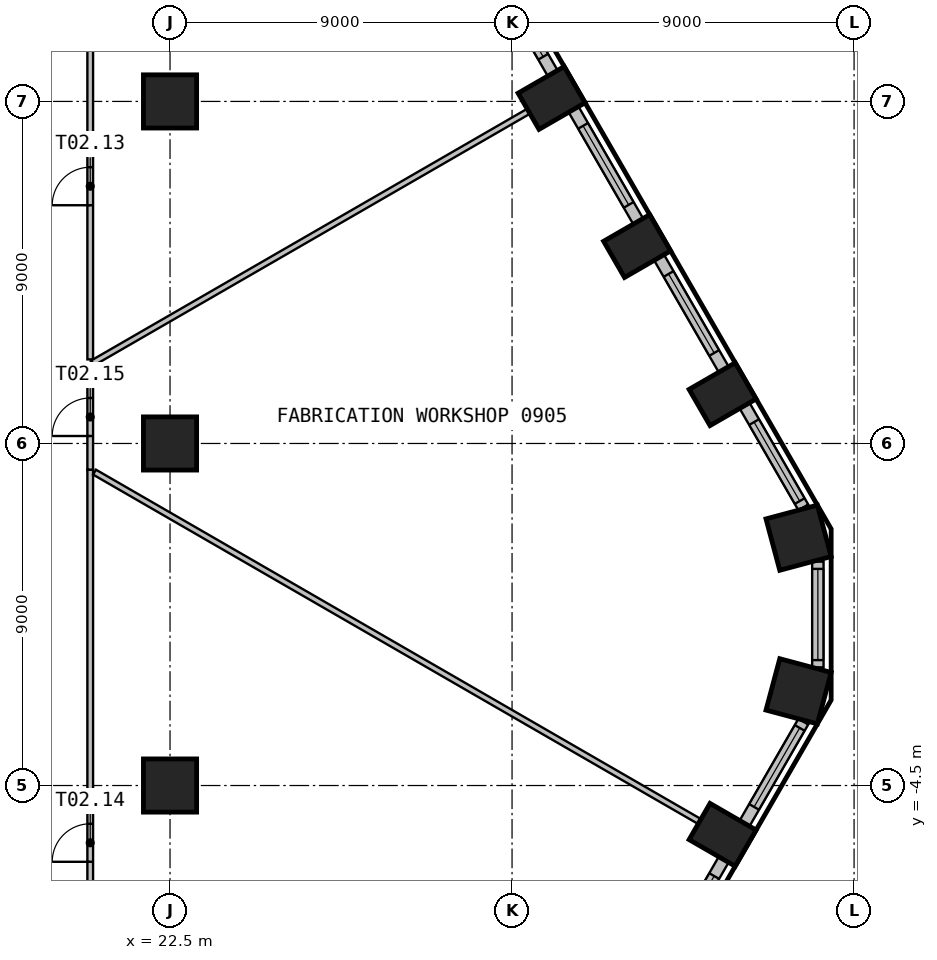
"""IFC4 building model, lengths in metres.
Left out: names, types, materials, properties, quantities, classifications, styles, units other than length and angle.
Written with IfcOpenShell. Run it as: python <this file> out.ifc"""

import sys

from ifc_helpers import new_model, si_unit, direction, frame, frame_2d, origin, origin_2d, place, context, subcontext, project, spatial, rectangle, circle, extrude, element, fill, save


model = new_model("IFC4")
c1 = context("Model", 3, precision=1e-05, world=origin(), true_north=direction((0.0, 1.0)))
c2 = subcontext(c1, "Body", "Model", "MODEL_VIEW")
j1 = project(units=[si_unit("LENGTHUNIT", "METRE"), si_unit("PLANEANGLEUNIT", "RADIAN")], contexts=[c1])
p1 = place(None, origin())
s1 = spatial("IfcSite", under=j1, at=p1, CompositionType="ELEMENT")
p2 = place(p1, origin())
s2 = spatial("IfcBuilding", under=s1, at=p2, CompositionType="ELEMENT")
p3 = place(p2, frame((0.0, 0.0, 41.7)))
s3 = spatial("IfcBuildingStorey", under=s2, at=p3, CompositionType="ELEMENT", Elevation=41.7)
p4 = place(p3, frame((37.041, -5.797, 0.0), z_axis=(0.0, 0.0, 1.0), x_axis=(0.5, 0.866025403784, 0.0)))
e1 = element("IfcColumn", 1, at=p4, inside=s3, PredefinedType="COLUMN", context=c2, shape_type="SweptSolid", body=[
    extrude(rectangle(XDim=1.1, YDim=1.4, at=origin_2d()), origin(), (0.0, 0.0, 1.0), 3.525),
])
for number, where, z_axis, x_axis in (
    (2, (39.04, -2.02, 0.0), (0.0, 0.0, 1.0), (0.259, 0.966, 0.0)),
    (3, (39.04, 2.02, 0.0), (0.0, 0.0, 1.0), (-0.259, 0.966, 0.0)),
):
    element("IfcColumn", number, at=place(p3, frame(where, z_axis=z_axis, x_axis=x_axis)), inside=s3, PredefinedType="COLUMN", context=c2, shape_type="SweptSolid", body=[
        extrude(rectangle(XDim=1.4, YDim=1.4, at=origin_2d()), origin(), (0.0, 0.0, 1.0), 3.525),
    ])
for number, where, z_axis, x_axis in (
    (4, (37.041, 5.797, 0.0), (0.0, 0.0, 1.0), (-0.5, 0.866, 0.0)),
    (5, (34.791, 9.694, 0.0), (0.0, 0.0, 1.0), (-0.5, 0.866, 0.0)),
    (6, (32.541, 13.591, 0.0), (0.0, 0.0, 1.0), (-0.5, 0.866, 0.0)),
):
    element("IfcColumn", number, at=place(p3, frame(where, z_axis=z_axis, x_axis=x_axis)), inside=s3, PredefinedType="COLUMN", context=c2, shape_type="SweptSolid", body=[
        extrude(rectangle(XDim=1.1, YDim=1.4, at=origin_2d()), origin(), (0.0, 0.0, 1.0), 3.525),
    ])
for number, where, z_axis, x_axis in (
    (7, (22.5, -4.5, 0.0), (0.0, 0.0, 1.0), (1.0, 0.0, 0.0)),
    (8, (22.5, 4.5, 0.0), (0.0, 0.0, 1.0), (1.0, 0.0, 0.0)),
    (9, (22.5, 13.5, 0.0), (0.0, 0.0, 1.0), (1.0, 0.0, 0.0)),
):
    element("IfcColumn", number, at=place(p3, frame(where, z_axis=z_axis, x_axis=x_axis)), inside=s3, PredefinedType="COLUMN", context=c2, shape_type="SweptSolid", body=[
        extrude(circle(Radius=0.7, at=origin_2d()), origin(), (0.0, 0.0, 1.0), 3.525),
    ])
p5 = place(p3, frame((35.369, -9.393, 0.0), z_axis=(0.0, 0.0, 1.0), x_axis=(0.499993955907, 0.866028893315, 0.0)))
e10 = element("IfcWall", 10, at=p5, inside=s3, PredefinedType="SOLIDWALL", context=c2, shape_type="SweptSolid", body=[
    extrude(rectangle(XDim=3.399, YDim=0.3, at=frame_2d((1.699, 0.0))), origin(), (0.0, 0.0, 1.0), 3.525),
])
p6 = place(p5, frame((0.5, 0.0, 0.9)))
e11 = element("IfcOpeningElement", 11, at=p6, cuts=e10, PredefinedType="OPENING", context=c2, shape_type="SweptSolid", body=[
    extrude(rectangle(XDim=2.4, YDim=2.1, at=frame_2d((1.2, 1.05))), frame((0.0, 0.16, 0.0), z_axis=(0.0, -1.0, 0.0), x_axis=(1.0, 0.0, 0.0)), (0.0, 0.0, 1.0), 0.32),
])
p7 = place(p3, frame((37.619, -5.495, 0.0), z_axis=(0.0, 0.0, 1.0), x_axis=(0.49997090907, 0.866042198789, 0.0)))
e12 = element("IfcWall", 12, at=p7, inside=s3, PredefinedType="SOLIDWALL", context=c2, shape_type="SweptSolid", body=[
    extrude(rectangle(XDim=3.091, YDim=0.3, at=frame_2d((1.545, 0.0))), origin(), (0.0, 0.0, 1.0), 3.525),
])
p8 = place(p7, frame((0.5, 0.0, 0.9)))
e13 = element("IfcOpeningElement", 13, at=p8, cuts=e12, PredefinedType="OPENING", context=c2, shape_type="SweptSolid", body=[
    extrude(rectangle(XDim=2.4, YDim=2.1, at=frame_2d((1.2, 1.05))), frame((0.0, 0.16, 0.0), z_axis=(0.0, -1.0, 0.0), x_axis=(1.0, 0.0, 0.0)), (0.0, 0.0, 1.0), 0.32),
])
p9 = place(p3, frame((39.547, -1.391, 0.0), z_axis=(0.0, 0.0, 1.0), x_axis=(0.0, 1.0, 0.0)))
e14 = element("IfcWall", 14, at=p9, inside=s3, PredefinedType="SOLIDWALL", context=c2, shape_type="SweptSolid", body=[
    extrude(rectangle(XDim=2.782, YDim=0.3, at=frame_2d((1.391, 0.0))), origin(), (0.0, 0.0, 1.0), 3.525),
])
p10 = place(p9, frame((0.191, 0.0, 0.9)))
e15 = element("IfcOpeningElement", 15, at=p10, cuts=e14, PredefinedType="OPENING", context=c2, shape_type="SweptSolid", body=[
    extrude(rectangle(XDim=2.4, YDim=2.1, at=frame_2d((1.2, 1.05))), frame((0.0, 0.16, 0.0), z_axis=(0.0, -1.0, 0.0), x_axis=(1.0, 0.0, 0.0)), (0.0, 0.0, 1.0), 0.32),
])
p11 = place(p3, frame((39.165, 2.819, 0.0), z_axis=(0.0, 0.0, 1.0), x_axis=(-0.49997090907, 0.866042198789, 0.0)))
e16 = element("IfcWall", 16, at=p11, inside=s3, PredefinedType="SOLIDWALL", context=c2, shape_type="SweptSolid", body=[
    extrude(rectangle(XDim=3.091, YDim=0.3, at=frame_2d((1.545, 0.0))), origin(), (0.0, 0.0, 1.0), 3.525),
])
p12 = place(p11, frame((0.191, 0.0, 0.9)))
e17 = element("IfcOpeningElement", 17, at=p12, cuts=e16, PredefinedType="OPENING", context=c2, shape_type="SweptSolid", body=[
    extrude(rectangle(XDim=2.4, YDim=2.1, at=frame_2d((1.2, 1.05))), frame((0.0, 0.16, 0.0), z_axis=(0.0, -1.0, 0.0), x_axis=(1.0, 0.0, 0.0)), (0.0, 0.0, 1.0), 0.32),
])
p13 = place(p3, frame((37.069, 6.449, 0.0), z_axis=(0.0, 0.0, 1.0), x_axis=(-0.499993955907, 0.866028893315, 0.0)))
e18 = element("IfcWall", 18, at=p13, inside=s3, PredefinedType="SOLIDWALL", context=c2, shape_type="SweptSolid", body=[
    extrude(rectangle(XDim=3.399, YDim=0.3, at=frame_2d((1.699, 0.0))), origin(), (0.0, 0.0, 1.0), 3.525),
])
p14 = place(p13, frame((0.5, 0.0, 0.9)))
e19 = element("IfcOpeningElement", 19, at=p14, cuts=e18, PredefinedType="OPENING", context=c2, shape_type="SweptSolid", body=[
    extrude(rectangle(XDim=2.4, YDim=2.1, at=frame_2d((1.2, 1.05))), frame((0.0, 0.16, 0.0), z_axis=(0.0, -1.0, 0.0), x_axis=(1.0, 0.0, 0.0)), (0.0, 0.0, 1.0), 0.32),
])
p15 = place(p3, frame((34.819, 10.346, 0.0), z_axis=(0.0, 0.0, 1.0), x_axis=(-0.499993955907, 0.866028893315, 0.0)))
e20 = element("IfcWall", 20, at=p15, inside=s3, PredefinedType="SOLIDWALL", context=c2, shape_type="SweptSolid", body=[
    extrude(rectangle(XDim=3.399, YDim=0.3, at=frame_2d((1.699, 0.0))), origin(), (0.0, 0.0, 1.0), 3.525),
])
p16 = place(p15, frame((0.5, 0.0, 0.9)))
e21 = element("IfcOpeningElement", 21, at=p16, cuts=e20, PredefinedType="OPENING", context=c2, shape_type="SweptSolid", body=[
    extrude(rectangle(XDim=2.4, YDim=2.1, at=frame_2d((1.2, 1.05))), frame((0.0, 0.16, 0.0), z_axis=(0.0, -1.0, 0.0), x_axis=(1.0, 0.0, 0.0)), (0.0, 0.0, 1.0), 0.32),
])
p17 = place(p3, frame((32.569, 14.243, 0.0), z_axis=(0.0, 0.0, 1.0), x_axis=(-0.499993955907, 0.866028893315, 0.0)))
e22 = element("IfcWall", 22, at=p17, inside=s3, PredefinedType="SOLIDWALL", context=c2, shape_type="SweptSolid", body=[
    extrude(rectangle(XDim=3.399, YDim=0.3, at=frame_2d((1.699, 0.0))), origin(), (0.0, 0.0, 1.0), 3.525),
])
p18 = place(p17, frame((0.5, 0.0, 0.9)))
e23 = element("IfcOpeningElement", 23, at=p18, cuts=e22, PredefinedType="OPENING", context=c2, shape_type="SweptSolid", body=[
    extrude(rectangle(XDim=2.4, YDim=2.1, at=frame_2d((1.2, 1.05))), frame((0.0, 0.16, 0.0), z_axis=(0.0, -1.0, 0.0), x_axis=(1.0, 0.0, 0.0)), (0.0, 0.0, 1.0), 0.32),
])
p19 = place(p3, frame((20.4, -15.825, 0.0), z_axis=(0.0, 0.0, 1.0), x_axis=(0.0, 1.0, 0.0)))
e24 = element("IfcWall", 24, at=p19, inside=s3, PredefinedType="PARTITIONING", context=c2, shape_type="SweptSolid", body=[
    extrude(rectangle(XDim=19.636, YDim=0.15, at=frame_2d((9.818, 0.0))), origin(), (0.0, 0.0, 1.0), 3.525),
])
p20 = place(p19, frame((9.318, 0.0, 0.0)))
e25 = element("IfcOpeningElement", 25, at=p20, cuts=e24, PredefinedType="OPENING", context=c2, shape_type="SweptSolid", body=[
    extrude(rectangle(XDim=1.0, YDim=2.1, at=frame_2d((0.5, 1.05))), frame((0.0, 0.085, 0.0), z_axis=(0.0, -1.0, 0.0), x_axis=(1.0, 0.0, 0.0)), (0.0, 0.0, 1.0), 0.17),
])
p21 = place(p3, frame((20.4, 3.811, 0.0), z_axis=(0.0, 0.0, 1.0), x_axis=(0.0, 1.0, 0.0)))
e26 = element("IfcWall", 26, at=p21, inside=s3, PredefinedType="PARTITIONING", context=c2, shape_type="SweptSolid", body=[
    extrude(rectangle(XDim=2.771, YDim=0.15, at=frame_2d((1.385, 0.0))), origin(), (0.0, 0.0, 1.0), 3.525),
])
p22 = place(p21, frame((0.885, 0.0, 0.0)))
e27 = element("IfcOpeningElement", 27, at=p22, cuts=e26, PredefinedType="OPENING", context=c2, shape_type="SweptSolid", body=[
    extrude(rectangle(XDim=1.0, YDim=2.1, at=frame_2d((0.5, 1.05))), frame((0.0, 0.085, 0.0), z_axis=(0.0, -1.0, 0.0), x_axis=(1.0, 0.0, 0.0)), (0.0, 0.0, 1.0), 0.17),
])
p23 = place(p3, frame((20.513, 3.746, 0.0), z_axis=(0.0, 0.0, 1.0), x_axis=(0.866010916479, -0.500025091909, 0.0)))
e28 = element("IfcWall", 28, at=p23, inside=s3, PredefinedType="PARTITIONING", context=c2, shape_type="SweptSolid", body=[
    extrude(rectangle(XDim=18.365, YDim=0.15, at=frame_2d((9.183, 0.0))), origin(), (0.0, 0.0, 1.0), 3.525),
])
p24 = place(p3, frame((20.4, 6.712, 0.0), z_axis=(0.0, 0.0, 1.0), x_axis=(0.0, 1.0, 0.0)))
e29 = element("IfcWall", 29, at=p24, inside=s3, PredefinedType="PARTITIONING", context=c2, shape_type="SweptSolid", body=[
    extrude(rectangle(XDim=9.113, YDim=0.15, at=frame_2d((4.557, 0.0))), origin(), (0.0, 0.0, 1.0), 3.525),
])
p25 = place(p24, frame((4.056, 0.0, 0.0)))
e30 = element("IfcOpeningElement", 30, at=p25, cuts=e29, PredefinedType="OPENING", context=c2, shape_type="SweptSolid", body=[
    extrude(rectangle(XDim=1.0, YDim=2.1, at=frame_2d((0.5, 1.05))), frame((0.0, 0.085, 0.0), z_axis=(0.0, -1.0, 0.0), x_axis=(1.0, 0.0, 0.0)), (0.0, 0.0, 1.0), 0.17),
])
p26 = place(p3, frame((31.917, 13.231, 0.0), z_axis=(0.0, 0.0, 1.0), x_axis=(-0.866032788616, -0.499987208879, 0.0)))
e31 = element("IfcWall", 31, at=p26, inside=s3, PredefinedType="PARTITIONING", context=c2, shape_type="SweptSolid", body=[
    extrude(rectangle(XDim=13.224, YDim=0.15, at=frame_2d((6.612, 0.0))), origin(), (0.0, 0.0, 1.0), 3.525),
])
p27 = place(p6, origin())
e32 = element("IfcWindow", 32, at=p27, inside=s3, PartitioningType="SINGLE_PANEL", PredefinedType="WINDOW", context=c2, shape_type="SweptSolid", body=[
    extrude(rectangle(XDim=2.4, YDim=2.1, at=frame_2d((1.2, 1.05))), frame((0.0, 0.03, 0.0), z_axis=(0.0, -1.0, 0.0), x_axis=(1.0, 0.0, 0.0)), (0.0, 0.0, 1.0), 0.06),
])
fill(e11, e32)
p28 = place(p8, origin())
e33 = element("IfcWindow", 33, at=p28, inside=s3, PartitioningType="SINGLE_PANEL", PredefinedType="WINDOW", context=c2, shape_type="SweptSolid", body=[
    extrude(rectangle(XDim=2.4, YDim=2.1, at=frame_2d((1.2, 1.05))), frame((0.0, 0.03, 0.0), z_axis=(0.0, -1.0, 0.0), x_axis=(1.0, 0.0, 0.0)), (0.0, 0.0, 1.0), 0.06),
])
fill(e13, e33)
p29 = place(p10, origin())
e34 = element("IfcWindow", 34, at=p29, inside=s3, PartitioningType="SINGLE_PANEL", PredefinedType="WINDOW", context=c2, shape_type="SweptSolid", body=[
    extrude(rectangle(XDim=2.4, YDim=2.1, at=frame_2d((1.2, 1.05))), frame((0.0, 0.03, 0.0), z_axis=(0.0, -1.0, 0.0), x_axis=(1.0, 0.0, 0.0)), (0.0, 0.0, 1.0), 0.06),
])
fill(e15, e34)
p30 = place(p12, origin())
e35 = element("IfcWindow", 35, at=p30, inside=s3, PartitioningType="SINGLE_PANEL", PredefinedType="WINDOW", context=c2, shape_type="SweptSolid", body=[
    extrude(rectangle(XDim=2.4, YDim=2.1, at=frame_2d((1.2, 1.05))), frame((0.0, 0.03, 0.0), z_axis=(0.0, -1.0, 0.0), x_axis=(1.0, 0.0, 0.0)), (0.0, 0.0, 1.0), 0.06),
])
fill(e17, e35)
p31 = place(p14, origin())
e36 = element("IfcWindow", 36, at=p31, inside=s3, PartitioningType="SINGLE_PANEL", PredefinedType="WINDOW", context=c2, shape_type="SweptSolid", body=[
    extrude(rectangle(XDim=2.4, YDim=2.1, at=frame_2d((1.2, 1.05))), frame((0.0, 0.03, 0.0), z_axis=(0.0, -1.0, 0.0), x_axis=(1.0, 0.0, 0.0)), (0.0, 0.0, 1.0), 0.06),
])
fill(e19, e36)
p32 = place(p16, origin())
e37 = element("IfcWindow", 37, at=p32, inside=s3, PartitioningType="SINGLE_PANEL", PredefinedType="WINDOW", context=c2, shape_type="SweptSolid", body=[
    extrude(rectangle(XDim=2.4, YDim=2.1, at=frame_2d((1.2, 1.05))), frame((0.0, 0.03, 0.0), z_axis=(0.0, -1.0, 0.0), x_axis=(1.0, 0.0, 0.0)), (0.0, 0.0, 1.0), 0.06),
])
fill(e21, e37)
p33 = place(p18, origin())
e38 = element("IfcWindow", 38, at=p33, inside=s3, PartitioningType="SINGLE_PANEL", PredefinedType="WINDOW", context=c2, shape_type="SweptSolid", body=[
    extrude(rectangle(XDim=2.4, YDim=2.1, at=frame_2d((1.2, 1.05))), frame((0.0, 0.03, 0.0), z_axis=(0.0, -1.0, 0.0), x_axis=(1.0, 0.0, 0.0)), (0.0, 0.0, 1.0), 0.06),
])
fill(e23, e38)
p34 = place(p25, origin())
e39 = element("IfcDoor", 39, at=p34, inside=s3, OperationType="SINGLE_SWING_RIGHT", PredefinedType="DOOR", context=c2, shape_type="SweptSolid", body=[
    extrude(rectangle(XDim=1.0, YDim=2.1, at=frame_2d((0.5, 1.05))), frame((0.0, 0.025, 0.0), z_axis=(0.0, -1.0, 0.0), x_axis=(1.0, 0.0, 0.0)), (0.0, 0.0, 1.0), 0.05),
])
fill(e30, e39)
p35 = place(p20, origin())
e40 = element("IfcDoor", 40, at=p35, inside=s3, OperationType="SINGLE_SWING_LEFT", PredefinedType="DOOR", context=c2, shape_type="SweptSolid", body=[
    extrude(rectangle(XDim=1.0, YDim=2.1, at=frame_2d((0.5, 1.05))), frame((0.0, 0.025, 0.0), z_axis=(0.0, -1.0, 0.0), x_axis=(1.0, 0.0, 0.0)), (0.0, 0.0, 1.0), 0.05),
])
fill(e25, e40)
p36 = place(p22, origin())
e41 = element("IfcDoor", 41, at=p36, inside=s3, OperationType="SINGLE_SWING_RIGHT", PredefinedType="DOOR", context=c2, shape_type="SweptSolid", body=[
    extrude(rectangle(XDim=1.0, YDim=2.1, at=frame_2d((0.5, 1.05))), frame((0.0, 0.025, 0.0), z_axis=(0.0, -1.0, 0.0), x_axis=(1.0, 0.0, 0.0)), (0.0, 0.0, 1.0), 0.05),
])
fill(e27, e41)
save(model, sys.argv[1])
